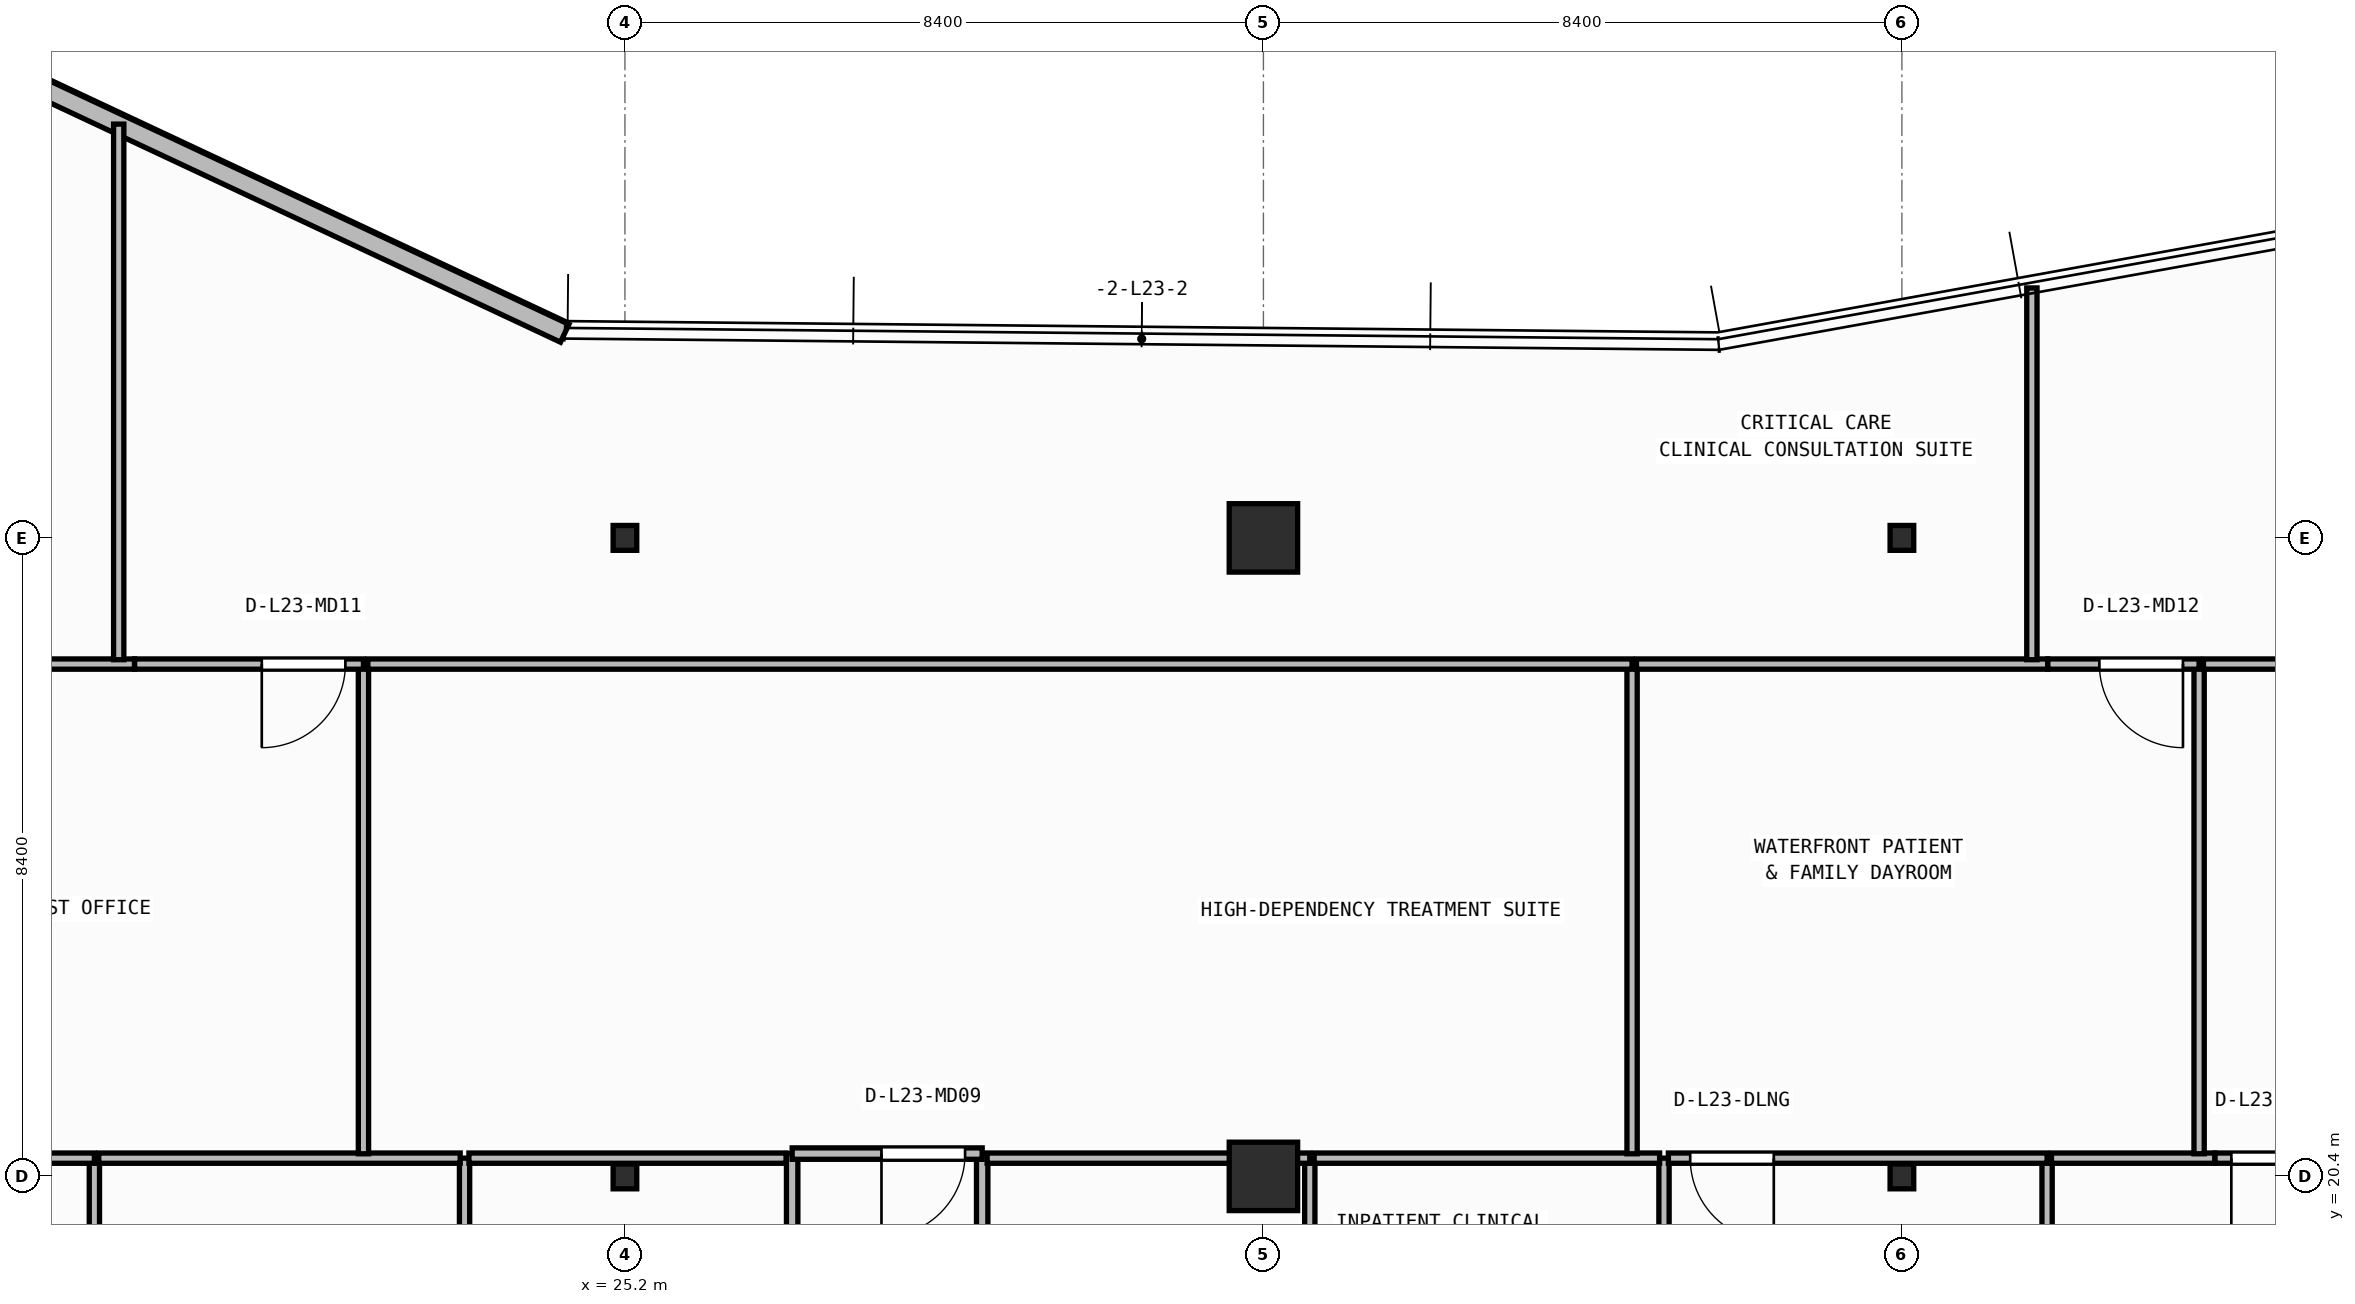
"""IFC4 building model, lengths in metres.
Left out: names, types, materials, properties, quantities, classifications, styles, units other than length and angle.
Written with IfcOpenShell. Run it as: python <this file> out.ifc"""

import sys

from ifc_helpers import new_model, si_unit, direction, frame, frame_2d, origin, origin_2d, place, context, subcontext, project, spatial, rectangle, i_section, extrude, element, fill, save


model = new_model("IFC4")
c1 = context("Model", 3, precision=1e-05, world=origin(), true_north=direction((0.0, 1.0)))
c2 = subcontext(c1, "Body", "Model", "MODEL_VIEW")
j1 = project(units=[si_unit("LENGTHUNIT", "METRE"), si_unit("PLANEANGLEUNIT", "RADIAN")], contexts=[c1])
p1 = place(None, origin())
s1 = spatial("IfcSite", under=j1, at=p1, CompositionType="ELEMENT")
p2 = place(p1, origin())
s2 = spatial("IfcBuilding", under=s1, at=p2, CompositionType="ELEMENT")
p3 = place(p2, frame((0.0, 0.0, 93.6)))
s3 = spatial("IfcBuildingStorey", under=s2, at=p3, CompositionType="ELEMENT", Elevation=93.6)
p4 = place(p3, frame((25.2, 20.4, 0.0), z_axis=(0.0, 0.0, 1.0), x_axis=(1.0, 0.0, 0.0)))
e1 = element("IfcColumn", 1, at=p4, inside=s3, PredefinedType="COLUMN", context=c2, shape_type="SweptSolid", body=[
    extrude(i_section(OverallWidth=0.311, OverallDepth=0.327, WebThickness=0.016, FlangeThickness=0.025, FilletRadius=0.017, at=origin_2d()), origin(), (0.0, 0.0, 1.0), 3.95),
])
p5 = place(p3, frame((33.6, 20.4, 0.0), z_axis=(0.0, 0.0, 1.0), x_axis=(1.0, 0.0, 0.0)))
e2 = element("IfcColumn", 2, at=p5, inside=s3, PredefinedType="COLUMN", context=c2, shape_type="SweptSolid", body=[
    extrude(rectangle(XDim=0.9, YDim=0.9, at=origin_2d()), origin(), (0.0, 0.0, 1.0), 3.95),
])
for number, where, z_axis, x_axis in (
    (3, (42.0, 20.4, 0.0), (0.0, 0.0, 1.0), (1.0, 0.0, 0.0)),
    (4, (25.2, 28.8, 0.0), (0.0, 0.0, 1.0), (1.0, 0.0, 0.0)),
):
    element("IfcColumn", number, at=place(p3, frame(where, z_axis=z_axis, x_axis=x_axis)), inside=s3, PredefinedType="COLUMN", context=c2, shape_type="SweptSolid", body=[
        extrude(i_section(OverallWidth=0.311, OverallDepth=0.327, WebThickness=0.016, FlangeThickness=0.025, FilletRadius=0.017, at=origin_2d()), origin(), (0.0, 0.0, 1.0), 3.95),
    ])
p6 = place(p3, frame((33.6, 28.8, 0.0), z_axis=(0.0, 0.0, 1.0), x_axis=(1.0, 0.0, 0.0)))
e5 = element("IfcColumn", 5, at=p6, inside=s3, PredefinedType="COLUMN", context=c2, shape_type="SweptSolid", body=[
    extrude(rectangle(XDim=0.9, YDim=0.9, at=origin_2d()), origin(), (0.0, 0.0, 1.0), 3.95),
])
p7 = place(p3, frame((42.0, 28.8, 0.0), z_axis=(0.0, 0.0, 1.0), x_axis=(1.0, 0.0, 0.0)))
e6 = element("IfcColumn", 6, at=p7, inside=s3, PredefinedType="COLUMN", context=c2, shape_type="SweptSolid", body=[
    extrude(i_section(OverallWidth=0.311, OverallDepth=0.327, WebThickness=0.016, FlangeThickness=0.025, FilletRadius=0.017, at=origin_2d()), origin(), (0.0, 0.0, 1.0), 3.95),
])
p8 = place(p3, frame((24.408, 31.492, 0.0), z_axis=(0.0, 0.0, 1.0), x_axis=(-0.905396522918, 0.424566998585, 0.0)))
e7 = element("IfcWall", 7, at=p8, inside=s3, PredefinedType="STANDARD", context=c2, shape_type="SweptSolid", body=[
    extrude(rectangle(XDim=14.189, YDim=0.26, at=frame_2d((7.095, 0.0))), origin(), (0.0, 0.0, 1.0), 3.67),
])
p9 = place(p8, frame((9.145, 0.0, 0.9)))
e8 = element("IfcOpeningElement", 8, at=p9, cuts=e7, PredefinedType="OPENING", context=c2, shape_type="SweptSolid", body=[
    extrude(rectangle(XDim=2.4, YDim=1.65, at=frame_2d((1.2, 0.825))), frame((0.0, 0.14, 0.0), z_axis=(0.0, -1.0, 0.0), x_axis=(1.0, 0.0, 0.0)), (0.0, 0.0, 1.0), 0.28),
])
for number, where, z_axis, x_axis in (
    (9, (27.4, 20.7, 0.0), (0.0, 0.0, 1.0), (0.0, -1.0, 0.0)),
    (10, (29.9, 14.7, 0.0), (0.0, 0.0, 1.0), (0.0, 1.0, 0.0)),
):
    element("IfcWall", number, at=place(p3, frame(where, z_axis=z_axis, x_axis=x_axis)), inside=s3, PredefinedType="PARTITIONING", context=c2, shape_type="SweptSolid", body=[
        extrude(rectangle(XDim=6.0, YDim=0.15, at=frame_2d((3.0, 0.0))), origin(), (0.0, 0.0, 1.0), 3.67),
    ])
p10 = place(p3, frame((29.9, 20.7, 0.0), z_axis=(0.0, 0.0, 1.0), x_axis=(-1.0, 0.0, 0.0)))
e11 = element("IfcWall", 11, at=p10, inside=s3, PredefinedType="PARTITIONING", context=c2, shape_type="SweptSolid", body=[
    extrude(rectangle(XDim=2.5, YDim=0.15, at=frame_2d((1.25, 0.0))), origin(), (0.0, 0.0, 1.0), 3.033),
])
p11 = place(p10, frame((0.225, 0.0, 0.0)))
e12 = element("IfcOpeningElement", 12, at=p11, cuts=e11, PredefinedType="OPENING", context=c2, shape_type="SweptSolid", body=[
    extrude(rectangle(XDim=1.1, YDim=2.1, at=frame_2d((0.55, 1.05))), frame((0.0, 0.085, 0.0), z_axis=(0.0, -1.0, 0.0), x_axis=(1.0, 0.0, 0.0)), (0.0, 0.0, 1.0), 0.17),
])
p12 = place(p3, frame((18.22, 17.833, 0.0), z_axis=(0.0, 0.0, 1.0), x_axis=(0.0, 1.0, 0.0)))
e13 = element("IfcWall", 13, at=p12, inside=s3, PredefinedType="PARTITIONING", context=c2, shape_type="SweptSolid", body=[
    extrude(rectangle(XDim=2.807, YDim=0.135, at=frame_2d((1.404, 0.0))), origin(), (0.0, 0.0, 1.0), 3.67),
])
p13 = place(p3, frame((18.22, 20.64, 0.0), z_axis=(0.0, 0.0, 1.0), x_axis=(-1.0, 0.0, 0.0)))
e14 = element("IfcWall", 14, at=p13, inside=s3, PredefinedType="PARTITIONING", context=c2, shape_type="SweptSolid", body=[
    extrude(rectangle(XDim=4.452, YDim=0.135, at=frame_2d((2.226, 0.0))), origin(), (0.0, 0.0, 1.0), 3.033),
])
p14 = place(p3, frame((23.09, 14.76, 0.0), z_axis=(0.0, 0.0, 1.0), x_axis=(0.0, 1.0, 0.0)))
e15 = element("IfcWall", 15, at=p14, inside=s3, PredefinedType="PARTITIONING", context=c2, shape_type="SweptSolid", body=[
    extrude(rectangle(XDim=5.88, YDim=0.135, at=frame_2d((2.94, 0.0))), origin(), (0.0, 0.0, 1.0), 3.67),
])
p15 = place(p3, frame((23.032, 20.64, 0.0), z_axis=(0.0, 0.0, 1.0), x_axis=(-1.0, 0.0, 0.0)))
e16 = element("IfcWall", 16, at=p15, inside=s3, PredefinedType="PARTITIONING", context=c2, shape_type="SweptSolid", body=[
    extrude(rectangle(XDim=4.755, YDim=0.135, at=frame_2d((2.377, 0.0))), origin(), (0.0, 0.0, 1.0), 3.033),
])
p16 = place(p3, frame((27.32, 20.64, 0.0), z_axis=(0.0, 0.0, 1.0), x_axis=(-1.0, 0.0, 0.0)))
e17 = element("IfcWall", 17, at=p16, inside=s3, PredefinedType="PARTITIONING", context=c2, shape_type="SweptSolid", body=[
    extrude(rectangle(XDim=4.173, YDim=0.135, at=frame_2d((2.086, 0.0))), origin(), (0.0, 0.0, 1.0), 3.033),
])
p17 = place(p3, frame((34.21, 17.833, 0.0), z_axis=(0.0, 0.0, 1.0), x_axis=(0.0, 1.0, 0.0)))
e18 = element("IfcWall", 18, at=p17, inside=s3, PredefinedType="PARTITIONING", context=c2, shape_type="SweptSolid", body=[
    extrude(rectangle(XDim=2.807, YDim=0.135, at=frame_2d((1.404, 0.0))), origin(), (0.0, 0.0, 1.0), 3.67),
])
p18 = place(p3, frame((34.21, 20.64, 0.0), z_axis=(0.0, 0.0, 1.0), x_axis=(-1.0, 0.0, 0.0)))
e19 = element("IfcWall", 19, at=p18, inside=s3, PredefinedType="PARTITIONING", context=c2, shape_type="SweptSolid", body=[
    extrude(rectangle(XDim=4.245, YDim=0.135, at=frame_2d((2.123, 0.0))), origin(), (0.0, 0.0, 1.0), 3.033),
])
p19 = place(p3, frame((38.87, 14.76, 0.0), z_axis=(0.0, 0.0, 1.0), x_axis=(0.0, 1.0, 0.0)))
e20 = element("IfcWall", 20, at=p19, inside=s3, PredefinedType="PARTITIONING", context=c2, shape_type="SweptSolid", body=[
    extrude(rectangle(XDim=5.88, YDim=0.135, at=frame_2d((2.94, 0.0))), origin(), (0.0, 0.0, 1.0), 3.67),
])
p20 = place(p3, frame((38.812, 20.64, 0.0), z_axis=(0.0, 0.0, 1.0), x_axis=(-1.0, 0.0, 0.0)))
e21 = element("IfcWall", 21, at=p20, inside=s3, PredefinedType="PARTITIONING", context=c2, shape_type="SweptSolid", body=[
    extrude(rectangle(XDim=4.545, YDim=0.135, at=frame_2d((2.272, 0.0))), origin(), (0.0, 0.0, 1.0), 3.033),
])
p21 = place(p3, frame((43.91, 17.833, 0.0), z_axis=(0.0, 0.0, 1.0), x_axis=(0.0, 1.0, 0.0)))
e22 = element("IfcWall", 22, at=p21, inside=s3, PredefinedType="PARTITIONING", context=c2, shape_type="SweptSolid", body=[
    extrude(rectangle(XDim=2.807, YDim=0.135, at=frame_2d((1.404, 0.0))), origin(), (0.0, 0.0, 1.0), 3.67),
])
p22 = place(p3, frame((43.91, 20.64, 0.0), z_axis=(0.0, 0.0, 1.0), x_axis=(-1.0, 0.0, 0.0)))
e23 = element("IfcWall", 23, at=p22, inside=s3, PredefinedType="PARTITIONING", context=c2, shape_type="SweptSolid", body=[
    extrude(rectangle(XDim=4.982, YDim=0.135, at=frame_2d((2.491, 0.0))), origin(), (0.0, 0.0, 1.0), 3.033),
])
p23 = place(p22, frame((3.595, 0.0, 0.0)))
e24 = element("IfcOpeningElement", 24, at=p23, cuts=e23, PredefinedType="OPENING", context=c2, shape_type="SweptSolid", body=[
    extrude(rectangle(XDim=1.1, YDim=2.1, at=frame_2d((0.55, 1.05))), frame((0.0, 0.077, 0.0), z_axis=(0.0, -1.0, 0.0), x_axis=(1.0, 0.0, 0.0)), (0.0, 0.0, 1.0), 0.155),
])
p24 = place(p3, frame((46.117, 20.64, 0.0), z_axis=(0.0, 0.0, 1.0), x_axis=(-1.0, 0.0, 0.0)))
e25 = element("IfcWall", 25, at=p24, inside=s3, PredefinedType="PARTITIONING", context=c2, shape_type="SweptSolid", body=[
    extrude(rectangle(XDim=2.15, YDim=0.135, at=frame_2d((1.075, 0.0))), origin(), (0.0, 0.0, 1.0), 3.033),
])
p25 = place(p3, frame((48.2, 20.64, 0.0), z_axis=(0.0, 0.0, 1.0), x_axis=(-1.0, 0.0, 0.0)))
e26 = element("IfcWall", 26, at=p25, inside=s3, PredefinedType="PARTITIONING", context=c2, shape_type="SweptSolid", body=[
    extrude(rectangle(XDim=2.081, YDim=0.135, at=frame_2d((1.04, 0.0))), origin(), (0.0, 0.0, 1.0), 3.033),
])
p26 = place(p25, frame((0.766, 0.0, 0.0)))
e27 = element("IfcOpeningElement", 27, at=p26, cuts=e26, PredefinedType="OPENING", context=c2, shape_type="SweptSolid", body=[
    extrude(rectangle(XDim=1.1, YDim=2.1, at=frame_2d((0.55, 1.05))), frame((0.0, 0.077, 0.0), z_axis=(0.0, -1.0, 0.0), x_axis=(1.0, 0.0, 0.0)), (0.0, 0.0, 1.0), 0.155),
])
p27 = place(p3, frame((21.76, 20.698, 0.0), z_axis=(0.0, 0.0, 1.0), x_axis=(0.0, 1.0, 0.0)))
e28 = element("IfcWall", 28, at=p27, inside=s3, PredefinedType="PARTITIONING", context=c2, shape_type="SweptSolid", body=[
    extrude(rectangle(XDim=6.442, YDim=0.135, at=frame_2d((3.221, 0.0))), origin(), (0.0, 0.0, 1.0), 3.67),
])
p28 = place(p3, frame((18.748, 27.14, 0.0), z_axis=(0.0, 0.0, 1.0), x_axis=(-1.0, 0.0, 0.0)))
e29 = element("IfcWall", 29, at=p28, inside=s3, PredefinedType="PARTITIONING", context=c2, shape_type="SweptSolid", body=[
    extrude(rectangle(XDim=9.1, YDim=0.135, at=frame_2d((4.55, 0.0))), origin(), (0.0, 0.0, 1.0), 3.67),
])
p29 = place(p3, frame((21.76, 27.14, 0.0), z_axis=(0.0, 0.0, 1.0), x_axis=(-1.0, 0.0, 0.0)))
e30 = element("IfcWall", 30, at=p29, inside=s3, PredefinedType="PARTITIONING", context=c2, shape_type="SweptSolid", body=[
    extrude(rectangle(XDim=3.01, YDim=0.135, at=frame_2d((1.505, 0.0))), origin(), (0.0, 0.0, 1.0), 3.67),
])
p30 = place(p29, frame((0.238, 0.0, 0.0)))
e31 = element("IfcOpeningElement", 31, at=p30, cuts=e30, PredefinedType="OPENING", context=c2, shape_type="SweptSolid", body=[
    extrude(rectangle(XDim=1.1, YDim=2.1, at=frame_2d((0.55, 1.05))), frame((0.0, 0.077, 0.0), z_axis=(0.0, -1.0, 0.0), x_axis=(1.0, 0.0, 0.0)), (0.0, 0.0, 1.0), 0.155),
])
p31 = place(p3, frame((38.45, 20.698, 0.0), z_axis=(0.0, 0.0, 1.0), x_axis=(0.0, 1.0, 0.0)))
e32 = element("IfcWall", 32, at=p31, inside=s3, PredefinedType="PARTITIONING", context=c2, shape_type="SweptSolid", body=[
    extrude(rectangle(XDim=6.442, YDim=0.135, at=frame_2d((3.221, 0.0))), origin(), (0.0, 0.0, 1.0), 3.67),
])
p32 = place(p3, frame((38.45, 27.14, 0.0), z_axis=(0.0, 0.0, 1.0), x_axis=(-1.0, 0.0, 0.0)))
e33 = element("IfcWall", 33, at=p32, inside=s3, PredefinedType="PARTITIONING", context=c2, shape_type="SweptSolid", body=[
    extrude(rectangle(XDim=16.633, YDim=0.135, at=frame_2d((8.316, 0.0))), origin(), (0.0, 0.0, 1.0), 3.67),
])
p33 = place(p3, frame((45.91, 20.698, 0.0), z_axis=(0.0, 0.0, 1.0), x_axis=(0.0, 1.0, 0.0)))
e34 = element("IfcWall", 34, at=p33, inside=s3, PredefinedType="PARTITIONING", context=c2, shape_type="SweptSolid", body=[
    extrude(rectangle(XDim=6.442, YDim=0.135, at=frame_2d((3.221, 0.0))), origin(), (0.0, 0.0, 1.0), 3.67),
])
p34 = place(p3, frame((43.917, 27.14, 0.0), z_axis=(0.0, 0.0, 1.0), x_axis=(-1.0, 0.0, 0.0)))
e35 = element("IfcWall", 35, at=p34, inside=s3, PredefinedType="PARTITIONING", context=c2, shape_type="SweptSolid", body=[
    extrude(rectangle(XDim=5.41, YDim=0.135, at=frame_2d((2.705, 0.0))), origin(), (0.0, 0.0, 1.0), 3.67),
])
p35 = place(p3, frame((45.91, 27.14, 0.0), z_axis=(0.0, 0.0, 1.0), x_axis=(-1.0, 0.0, 0.0)))
e36 = element("IfcWall", 36, at=p35, inside=s3, PredefinedType="PARTITIONING", context=c2, shape_type="SweptSolid", body=[
    extrude(rectangle(XDim=1.99, YDim=0.135, at=frame_2d((0.995, 0.0))), origin(), (0.0, 0.0, 1.0), 3.67),
])
p36 = place(p35, frame((0.212, 0.0, 0.0)))
e37 = element("IfcOpeningElement", 37, at=p36, cuts=e36, PredefinedType="OPENING", context=c2, shape_type="SweptSolid", body=[
    extrude(rectangle(XDim=1.1, YDim=2.1, at=frame_2d((0.55, 1.05))), frame((0.0, 0.077, 0.0), z_axis=(0.0, -1.0, 0.0), x_axis=(1.0, 0.0, 0.0)), (0.0, 0.0, 1.0), 0.155),
])
p37 = place(p3, frame((57.96, 27.14, 0.0), z_axis=(0.0, 0.0, 1.0), x_axis=(-1.0, 0.0, 0.0)))
e38 = element("IfcWall", 38, at=p37, inside=s3, PredefinedType="PARTITIONING", context=c2, shape_type="SweptSolid", body=[
    extrude(rectangle(XDim=11.992, YDim=0.135, at=frame_2d((5.996, 0.0))), origin(), (0.0, 0.0, 1.0), 3.67),
])
p38 = place(p3, frame((18.54, 27.198, 0.0), z_axis=(0.0, 0.0, 1.0), x_axis=(0.0, 1.0, 0.0)))
e39 = element("IfcWall", 39, at=p38, inside=s3, PredefinedType="PARTITIONING", context=c2, shape_type="SweptSolid", body=[
    extrude(rectangle(XDim=7.046, YDim=0.135, at=frame_2d((3.523, 0.0))), origin(), (0.0, 0.0, 1.0), 3.67),
])
p39 = place(p3, frame((43.71, 27.198, 0.0), z_axis=(0.0, 0.0, 1.0), x_axis=(0.0, 1.0, 0.0)))
e40 = element("IfcWall", 40, at=p39, inside=s3, PredefinedType="PARTITIONING", context=c2, shape_type="SweptSolid", body=[
    extrude(rectangle(XDim=4.891, YDim=0.135, at=frame_2d((2.445, 0.0))), origin(), (0.0, 0.0, 1.0), 3.67),
])
p40 = place(p11, origin())
e41 = element("IfcDoor", 41, at=p40, inside=s3, OperationType="SINGLE_SWING_RIGHT", PredefinedType="DOOR", context=c2, shape_type="SweptSolid", body=[
    extrude(rectangle(XDim=1.1, YDim=2.1, at=frame_2d((0.55, 1.05))), frame((0.0, 0.025, 0.0), z_axis=(0.0, -1.0, 0.0), x_axis=(1.0, 0.0, 0.0)), (0.0, 0.0, 1.0), 0.05),
])
fill(e12, e41)
p41 = place(p23, origin())
e42 = element("IfcDoor", 42, at=p41, inside=s3, OperationType="SINGLE_SWING_LEFT", PredefinedType="DOOR", context=c2, shape_type="SweptSolid", body=[
    extrude(rectangle(XDim=1.1, YDim=2.1, at=frame_2d((0.55, 1.05))), frame((0.0, 0.025, 0.0), z_axis=(0.0, -1.0, 0.0), x_axis=(1.0, 0.0, 0.0)), (0.0, 0.0, 1.0), 0.05),
])
fill(e24, e42)
p42 = place(p26, origin())
e43 = element("IfcDoor", 43, at=p42, inside=s3, OperationType="SINGLE_SWING_RIGHT", PredefinedType="DOOR", context=c2, shape_type="SweptSolid", body=[
    extrude(rectangle(XDim=1.1, YDim=2.1, at=frame_2d((0.55, 1.05))), frame((0.0, 0.025, 0.0), z_axis=(0.0, -1.0, 0.0), x_axis=(1.0, 0.0, 0.0)), (0.0, 0.0, 1.0), 0.05),
])
fill(e27, e43)
p43 = place(p30, origin())
e44 = element("IfcDoor", 44, at=p43, inside=s3, OperationType="SINGLE_SWING_RIGHT", PredefinedType="DOOR", context=c2, shape_type="SweptSolid", body=[
    extrude(rectangle(XDim=1.1, YDim=2.1, at=frame_2d((0.55, 1.05))), frame((0.0, 0.025, 0.0), z_axis=(0.0, -1.0, 0.0), x_axis=(1.0, 0.0, 0.0)), (0.0, 0.0, 1.0), 0.05),
])
fill(e31, e44)
p44 = place(p36, origin())
e45 = element("IfcDoor", 45, at=p44, inside=s3, OperationType="SINGLE_SWING_LEFT", PredefinedType="DOOR", context=c2, shape_type="SweptSolid", body=[
    extrude(rectangle(XDim=1.1, YDim=2.1, at=frame_2d((0.55, 1.05))), frame((0.0, 0.025, 0.0), z_axis=(0.0, -1.0, 0.0), x_axis=(1.0, 0.0, 0.0)), (0.0, 0.0, 1.0), 0.05),
])
fill(e37, e45)
save(model, sys.argv[1])
